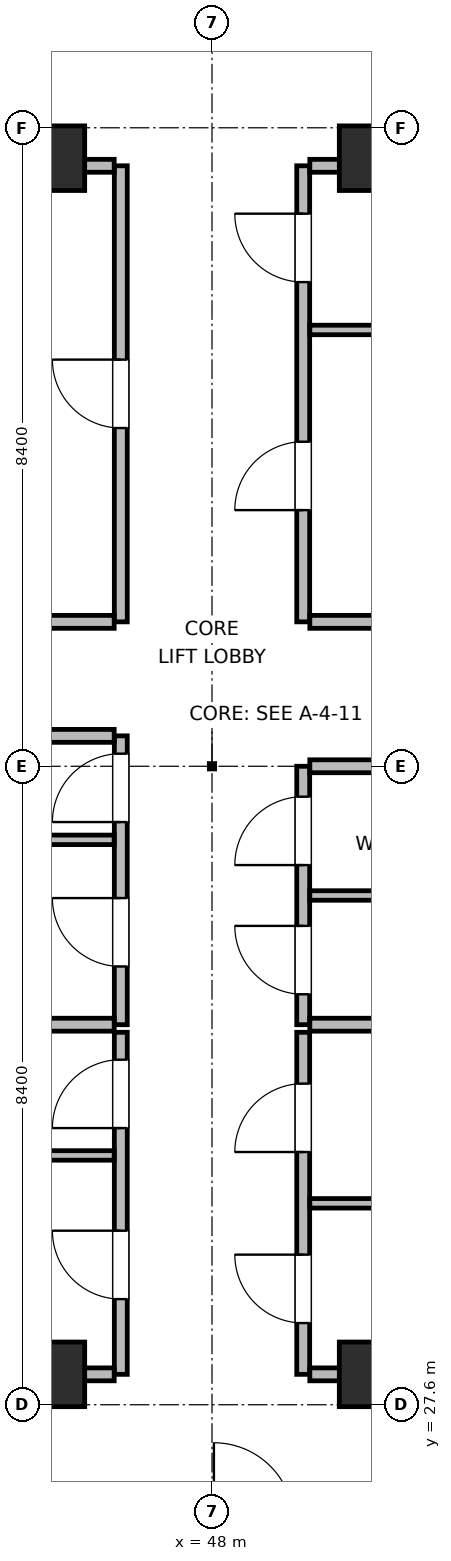
"""IFC4 building model, lengths in metres.
Left out: names, types, materials, properties, quantities, classifications, styles, units other than length and angle.
Written with IfcOpenShell. Run it as: python <this file> out.ifc"""

import sys

from ifc_helpers import new_model, si_unit, direction, frame, frame_2d, origin, origin_2d, place, context, subcontext, project, spatial, rectangle, extrude, element, fill, save


model = new_model("IFC4")
c1 = context("Model", 3, precision=1e-05, world=origin(), true_north=direction((0.0, 1.0)))
c2 = subcontext(c1, "Body", "Model", "MODEL_VIEW")
j1 = project(units=[si_unit("LENGTHUNIT", "METRE"), si_unit("PLANEANGLEUNIT", "RADIAN")], contexts=[c1])
p1 = place(None, origin())
s1 = spatial("IfcSite", under=j1, at=p1, CompositionType="ELEMENT")
p2 = place(p1, origin())
s2 = spatial("IfcBuilding", under=s1, at=p2, CompositionType="ELEMENT")
p3 = place(p2, frame((0.0, 0.0, 346.5)))
s3 = spatial("IfcBuildingStorey", under=s2, at=p3, CompositionType="ELEMENT", Elevation=346.5)
for number, where, z_axis, x_axis in (
    (1, (45.9, 28.0, 0.0), (0.0, 0.0, 1.0), (1.0, 0.0, 0.0)),
    (2, (50.1, 28.0, 0.0), (0.0, 0.0, 1.0), (1.0, 0.0, 0.0)),
    (3, (45.9, 44.0, 0.0), (0.0, 0.0, 1.0), (1.0, 0.0, 0.0)),
    (4, (50.1, 44.0, 0.0), (0.0, 0.0, 1.0), (1.0, 0.0, 0.0)),
):
    element("IfcColumn", number, at=place(p3, frame(where, z_axis=z_axis, x_axis=x_axis)), inside=s3, PredefinedType="COLUMN", context=c2, shape_type="SweptSolid", body=[
        extrude(rectangle(XDim=0.85, YDim=0.85, at=origin_2d()), origin(), (0.0, 0.0, 1.0), 3.9),
    ])
p4 = place(p3, frame((46.8, 32.6, 0.0), z_axis=(0.0, 0.0, 1.0), x_axis=(0.0, 1.0, 0.0)))
e5 = element("IfcWall", 5, at=p4, inside=s3, PredefinedType="PARTITIONING", context=c2, shape_type="SweptSolid", body=[
    extrude(rectangle(XDim=3.8, YDim=0.17, at=frame_2d((1.9, 0.0))), origin(), (0.0, 0.0, 1.0), 3.68),
])
p5 = place(p4, frame((0.766, 0.0, 0.0)))
e6 = element("IfcOpeningElement", 6, at=p5, cuts=e5, PredefinedType="OPENING", context=c2, shape_type="SweptSolid", body=[
    extrude(rectangle(XDim=0.9, YDim=2.02, at=frame_2d((0.45, 1.01))), frame((0.0, 0.095, 0.0), z_axis=(0.0, -1.0, 0.0), x_axis=(1.0, 0.0, 0.0)), (0.0, 0.0, 1.0), 0.19),
])
p6 = place(p4, frame((2.666, 0.0, 0.0)))
e7 = element("IfcOpeningElement", 7, at=p6, cuts=e5, PredefinedType="OPENING", context=c2, shape_type="SweptSolid", body=[
    extrude(rectangle(XDim=0.9, YDim=2.02, at=frame_2d((0.45, 1.01))), frame((0.0, 0.095, 0.0), z_axis=(0.0, -1.0, 0.0), x_axis=(1.0, 0.0, 0.0)), (0.0, 0.0, 1.0), 0.19),
])
for number, where, z_axis, x_axis in (
    (8, (43.8, 32.6, 0.0), (0.0, 0.0, 1.0), (1.0, 0.0, 0.0)),
    (9, (43.8, 36.4, 0.0), (0.0, 0.0, 1.0), (1.0, 0.0, 0.0)),
):
    element("IfcWall", number, at=place(p3, frame(where, z_axis=z_axis, x_axis=x_axis)), inside=s3, PredefinedType="PARTITIONING", context=c2, shape_type="SweptSolid", body=[
        extrude(rectangle(XDim=2.913, YDim=0.17, at=frame_2d((1.457, 0.0))), origin(), (0.0, 0.0, 1.0), 3.68),
    ])
p7 = place(p3, frame((43.8, 35.032, 0.0), z_axis=(0.0, 0.0, 1.0), x_axis=(1.0, 0.0, 0.0)))
e10 = element("IfcWall", 10, at=p7, inside=s3, PredefinedType="PARTITIONING", context=c2, shape_type="SweptSolid", body=[
    extrude(rectangle(XDim=2.913, YDim=0.125, at=frame_2d((1.457, 0.0))), origin(), (0.0, 0.0, 1.0), 3.68),
])
p8 = place(p3, frame((49.2, 32.6, 0.0), z_axis=(0.0, 0.0, 1.0), x_axis=(0.0, 1.0, 0.0)))
e11 = element("IfcWall", 11, at=p8, inside=s3, PredefinedType="PARTITIONING", context=c2, shape_type="SweptSolid", body=[
    extrude(rectangle(XDim=3.4, YDim=0.17, at=frame_2d((1.7, 0.0))), origin(), (0.0, 0.0, 1.0), 3.68),
])
p9 = place(p8, frame((0.4, 0.0, 0.0)))
e12 = element("IfcOpeningElement", 12, at=p9, cuts=e11, PredefinedType="OPENING", context=c2, shape_type="SweptSolid", body=[
    extrude(rectangle(XDim=0.9, YDim=2.02, at=frame_2d((0.45, 1.01))), frame((0.0, 0.095, 0.0), z_axis=(0.0, -1.0, 0.0), x_axis=(1.0, 0.0, 0.0)), (0.0, 0.0, 1.0), 0.19),
])
p10 = place(p8, frame((2.1, 0.0, 0.0)))
e13 = element("IfcOpeningElement", 13, at=p10, cuts=e11, PredefinedType="OPENING", context=c2, shape_type="SweptSolid", body=[
    extrude(rectangle(XDim=0.9, YDim=2.02, at=frame_2d((0.45, 1.01))), frame((0.0, 0.095, 0.0), z_axis=(0.0, -1.0, 0.0), x_axis=(1.0, 0.0, 0.0)), (0.0, 0.0, 1.0), 0.19),
])
for number, where, z_axis, x_axis in (
    (14, (49.287, 32.6, 0.0), (0.0, 0.0, 1.0), (1.0, 0.0, 0.0)),
    (15, (49.287, 36.0, 0.0), (0.0, 0.0, 1.0), (1.0, 0.0, 0.0)),
):
    element("IfcWall", number, at=place(p3, frame(where, z_axis=z_axis, x_axis=x_axis)), inside=s3, PredefinedType="PARTITIONING", context=c2, shape_type="SweptSolid", body=[
        extrude(rectangle(XDim=2.913, YDim=0.17, at=frame_2d((1.457, 0.0))), origin(), (0.0, 0.0, 1.0), 3.68),
    ])
p11 = place(p3, frame((49.287, 34.3, 0.0), z_axis=(0.0, 0.0, 1.0), x_axis=(1.0, 0.0, 0.0)))
e16 = element("IfcWall", 16, at=p11, inside=s3, PredefinedType="PARTITIONING", context=c2, shape_type="SweptSolid", body=[
    extrude(rectangle(XDim=2.913, YDim=0.125, at=frame_2d((1.457, 0.0))), origin(), (0.0, 0.0, 1.0), 3.68),
])
p12 = place(p3, frame((46.8, 28.0, 0.0), z_axis=(0.0, 0.0, 1.0), x_axis=(0.0, 1.0, 0.0)))
e17 = element("IfcWall", 17, at=p12, inside=s3, PredefinedType="PARTITIONING", context=c2, shape_type="SweptSolid", body=[
    extrude(rectangle(XDim=4.5, YDim=0.17, at=frame_2d((2.25, 0.0))), origin(), (0.0, 0.0, 1.0), 3.68),
])
p13 = place(p12, frame((0.99, 0.0, 0.0)))
e18 = element("IfcOpeningElement", 18, at=p13, cuts=e17, PredefinedType="OPENING", context=c2, shape_type="SweptSolid", body=[
    extrude(rectangle(XDim=0.9, YDim=2.02, at=frame_2d((0.45, 1.01))), frame((0.0, 0.095, 0.0), z_axis=(0.0, -1.0, 0.0), x_axis=(1.0, 0.0, 0.0)), (0.0, 0.0, 1.0), 0.19),
])
p14 = place(p12, frame((3.24, 0.0, 0.0)))
e19 = element("IfcOpeningElement", 19, at=p14, cuts=e17, PredefinedType="OPENING", context=c2, shape_type="SweptSolid", body=[
    extrude(rectangle(XDim=0.9, YDim=2.02, at=frame_2d((0.45, 1.01))), frame((0.0, 0.095, 0.0), z_axis=(0.0, -1.0, 0.0), x_axis=(1.0, 0.0, 0.0)), (0.0, 0.0, 1.0), 0.19),
])
p15 = place(p3, frame((42.5, 28.0, 0.0), z_axis=(0.0, 0.0, 1.0), x_axis=(1.0, 0.0, 0.0)))
e20 = element("IfcWall", 20, at=p15, inside=s3, PredefinedType="PARTITIONING", context=c2, shape_type="SweptSolid", body=[
    extrude(rectangle(XDim=4.213, YDim=0.17, at=frame_2d((2.106, 0.0))), origin(), (0.0, 0.0, 1.0), 2.765),
])
p16 = place(p3, frame((42.5, 30.88, 0.0), z_axis=(0.0, 0.0, 1.0), x_axis=(1.0, 0.0, 0.0)))
e21 = element("IfcWall", 21, at=p16, inside=s3, PredefinedType="PARTITIONING", context=c2, shape_type="SweptSolid", body=[
    extrude(rectangle(XDim=4.213, YDim=0.125, at=frame_2d((2.106, 0.0))), origin(), (0.0, 0.0, 1.0), 3.68),
])
p17 = place(p3, frame((49.2, 28.0, 0.0), z_axis=(0.0, 0.0, 1.0), x_axis=(0.0, 1.0, 0.0)))
e22 = element("IfcWall", 22, at=p17, inside=s3, PredefinedType="PARTITIONING", context=c2, shape_type="SweptSolid", body=[
    extrude(rectangle(XDim=4.5, YDim=0.17, at=frame_2d((2.25, 0.0))), origin(), (0.0, 0.0, 1.0), 3.68),
])
p18 = place(p17, frame((0.675, 0.0, 0.0)))
e23 = element("IfcOpeningElement", 23, at=p18, cuts=e22, PredefinedType="OPENING", context=c2, shape_type="SweptSolid", body=[
    extrude(rectangle(XDim=0.9, YDim=2.02, at=frame_2d((0.45, 1.01))), frame((0.0, 0.095, 0.0), z_axis=(0.0, -1.0, 0.0), x_axis=(1.0, 0.0, 0.0)), (0.0, 0.0, 1.0), 0.19),
])
p19 = place(p17, frame((2.925, 0.0, 0.0)))
e24 = element("IfcOpeningElement", 24, at=p19, cuts=e22, PredefinedType="OPENING", context=c2, shape_type="SweptSolid", body=[
    extrude(rectangle(XDim=0.9, YDim=2.02, at=frame_2d((0.45, 1.01))), frame((0.0, 0.095, 0.0), z_axis=(0.0, -1.0, 0.0), x_axis=(1.0, 0.0, 0.0)), (0.0, 0.0, 1.0), 0.19),
])
p20 = place(p3, frame((49.287, 28.0, 0.0), z_axis=(0.0, 0.0, 1.0), x_axis=(1.0, 0.0, 0.0)))
e25 = element("IfcWall", 25, at=p20, inside=s3, PredefinedType="PARTITIONING", context=c2, shape_type="SweptSolid", body=[
    extrude(rectangle(XDim=4.213, YDim=0.17, at=frame_2d((2.106, 0.0))), origin(), (0.0, 0.0, 1.0), 2.765),
])
p21 = place(p3, frame((49.287, 30.25, 0.0), z_axis=(0.0, 0.0, 1.0), x_axis=(1.0, 0.0, 0.0)))
e26 = element("IfcWall", 26, at=p21, inside=s3, PredefinedType="PARTITIONING", context=c2, shape_type="SweptSolid", body=[
    extrude(rectangle(XDim=4.213, YDim=0.125, at=frame_2d((2.106, 0.0))), origin(), (0.0, 0.0, 1.0), 3.68),
])
p22 = place(p3, frame((46.8, 37.9, 0.0), z_axis=(0.0, 0.0, 1.0), x_axis=(0.0, 1.0, 0.0)))
e27 = element("IfcWall", 27, at=p22, inside=s3, PredefinedType="PARTITIONING", context=c2, shape_type="SweptSolid", body=[
    extrude(rectangle(XDim=6.0, YDim=0.17, at=frame_2d((3.0, 0.0))), origin(), (0.0, 0.0, 1.0), 3.68),
])
p23 = place(p22, frame((2.55, 0.0, 0.0)))
e28 = element("IfcOpeningElement", 28, at=p23, cuts=e27, PredefinedType="OPENING", context=c2, shape_type="SweptSolid", body=[
    extrude(rectangle(XDim=0.9, YDim=2.02, at=frame_2d((0.45, 1.01))), frame((0.0, 0.095, 0.0), z_axis=(0.0, -1.0, 0.0), x_axis=(1.0, 0.0, 0.0)), (0.0, 0.0, 1.0), 0.19),
])
p24 = place(p3, frame((42.5, 37.9, 0.0), z_axis=(0.0, 0.0, 1.0), x_axis=(1.0, 0.0, 0.0)))
e29 = element("IfcWall", 29, at=p24, inside=s3, PredefinedType="PARTITIONING", context=c2, shape_type="SweptSolid", body=[
    extrude(rectangle(XDim=4.213, YDim=0.17, at=frame_2d((2.106, 0.0))), origin(), (0.0, 0.0, 1.0), 3.68),
])
p25 = place(p3, frame((42.5, 43.9, 0.0), z_axis=(0.0, 0.0, 1.0), x_axis=(1.0, 0.0, 0.0)))
e30 = element("IfcWall", 30, at=p25, inside=s3, PredefinedType="PARTITIONING", context=c2, shape_type="SweptSolid", body=[
    extrude(rectangle(XDim=4.213, YDim=0.17, at=frame_2d((2.106, 0.0))), origin(), (0.0, 0.0, 1.0), 2.765),
])
p26 = place(p3, frame((49.2, 37.9, 0.0), z_axis=(0.0, 0.0, 1.0), x_axis=(0.0, 1.0, 0.0)))
e31 = element("IfcWall", 31, at=p26, inside=s3, PredefinedType="PARTITIONING", context=c2, shape_type="SweptSolid", body=[
    extrude(rectangle(XDim=6.0, YDim=0.17, at=frame_2d((3.0, 0.0))), origin(), (0.0, 0.0, 1.0), 3.68),
])
p27 = place(p26, frame((1.47, 0.0, 0.0)))
e32 = element("IfcOpeningElement", 32, at=p27, cuts=e31, PredefinedType="OPENING", context=c2, shape_type="SweptSolid", body=[
    extrude(rectangle(XDim=0.9, YDim=2.02, at=frame_2d((0.45, 1.01))), frame((0.0, 0.095, 0.0), z_axis=(0.0, -1.0, 0.0), x_axis=(1.0, 0.0, 0.0)), (0.0, 0.0, 1.0), 0.19),
])
p28 = place(p26, frame((4.47, 0.0, 0.0)))
e33 = element("IfcOpeningElement", 33, at=p28, cuts=e31, PredefinedType="OPENING", context=c2, shape_type="SweptSolid", body=[
    extrude(rectangle(XDim=0.9, YDim=2.02, at=frame_2d((0.45, 1.01))), frame((0.0, 0.095, 0.0), z_axis=(0.0, -1.0, 0.0), x_axis=(1.0, 0.0, 0.0)), (0.0, 0.0, 1.0), 0.19),
])
p29 = place(p3, frame((49.287, 37.9, 0.0), z_axis=(0.0, 0.0, 1.0), x_axis=(1.0, 0.0, 0.0)))
e34 = element("IfcWall", 34, at=p29, inside=s3, PredefinedType="PARTITIONING", context=c2, shape_type="SweptSolid", body=[
    extrude(rectangle(XDim=4.113, YDim=0.17, at=frame_2d((2.056, 0.0))), origin(), (0.0, 0.0, 1.0), 3.68),
])
p30 = place(p3, frame((49.287, 43.9, 0.0), z_axis=(0.0, 0.0, 1.0), x_axis=(1.0, 0.0, 0.0)))
e35 = element("IfcWall", 35, at=p30, inside=s3, PredefinedType="PARTITIONING", context=c2, shape_type="SweptSolid", body=[
    extrude(rectangle(XDim=4.113, YDim=0.17, at=frame_2d((2.056, 0.0))), origin(), (0.0, 0.0, 1.0), 2.765),
])
p31 = place(p3, frame((49.287, 41.74, 0.0), z_axis=(0.0, 0.0, 1.0), x_axis=(1.0, 0.0, 0.0)))
e36 = element("IfcWall", 36, at=p31, inside=s3, PredefinedType="PARTITIONING", context=c2, shape_type="SweptSolid", body=[
    extrude(rectangle(XDim=4.113, YDim=0.125, at=frame_2d((2.056, 0.0))), origin(), (0.0, 0.0, 1.0), 3.68),
])
p32 = place(p5, origin())
e37 = element("IfcDoor", 37, at=p32, inside=s3, OperationType="SINGLE_SWING_RIGHT", PredefinedType="DOOR", context=c2, shape_type="SweptSolid", body=[
    extrude(rectangle(XDim=0.9, YDim=2.02, at=frame_2d((0.45, 1.01))), frame((0.0, 0.025, 0.0), z_axis=(0.0, -1.0, 0.0), x_axis=(1.0, 0.0, 0.0)), (0.0, 0.0, 1.0), 0.05),
])
fill(e6, e37)
p33 = place(p6, origin())
e38 = element("IfcDoor", 38, at=p33, inside=s3, OperationType="SINGLE_SWING_LEFT", PredefinedType="DOOR", context=c2, shape_type="SweptSolid", body=[
    extrude(rectangle(XDim=0.9, YDim=2.02, at=frame_2d((0.45, 1.01))), frame((0.0, 0.025, 0.0), z_axis=(0.0, -1.0, 0.0), x_axis=(1.0, 0.0, 0.0)), (0.0, 0.0, 1.0), 0.05),
])
fill(e7, e38)
p34 = place(p9, origin())
e39 = element("IfcDoor", 39, at=p34, inside=s3, OperationType="SINGLE_SWING_RIGHT", PredefinedType="DOOR", context=c2, shape_type="SweptSolid", body=[
    extrude(rectangle(XDim=0.9, YDim=2.02, at=frame_2d((0.45, 1.01))), frame((0.0, 0.025, 0.0), z_axis=(0.0, -1.0, 0.0), x_axis=(1.0, 0.0, 0.0)), (0.0, 0.0, 1.0), 0.05),
])
fill(e12, e39)
p35 = place(p10, origin())
e40 = element("IfcDoor", 40, at=p35, inside=s3, OperationType="SINGLE_SWING_LEFT", PredefinedType="DOOR", context=c2, shape_type="SweptSolid", body=[
    extrude(rectangle(XDim=0.9, YDim=2.02, at=frame_2d((0.45, 1.01))), frame((0.0, 0.025, 0.0), z_axis=(0.0, -1.0, 0.0), x_axis=(1.0, 0.0, 0.0)), (0.0, 0.0, 1.0), 0.05),
])
fill(e13, e40)
p36 = place(p13, origin())
e41 = element("IfcDoor", 41, at=p36, inside=s3, OperationType="SINGLE_SWING_RIGHT", PredefinedType="DOOR", context=c2, shape_type="SweptSolid", body=[
    extrude(rectangle(XDim=0.9, YDim=2.02, at=frame_2d((0.45, 1.01))), frame((0.0, 0.025, 0.0), z_axis=(0.0, -1.0, 0.0), x_axis=(1.0, 0.0, 0.0)), (0.0, 0.0, 1.0), 0.05),
])
fill(e18, e41)
p37 = place(p14, origin())
e42 = element("IfcDoor", 42, at=p37, inside=s3, OperationType="SINGLE_SWING_LEFT", PredefinedType="DOOR", context=c2, shape_type="SweptSolid", body=[
    extrude(rectangle(XDim=0.9, YDim=2.02, at=frame_2d((0.45, 1.01))), frame((0.0, 0.025, 0.0), z_axis=(0.0, -1.0, 0.0), x_axis=(1.0, 0.0, 0.0)), (0.0, 0.0, 1.0), 0.05),
])
fill(e19, e42)
p38 = place(p18, origin())
e43 = element("IfcDoor", 43, at=p38, inside=s3, OperationType="SINGLE_SWING_RIGHT", PredefinedType="DOOR", context=c2, shape_type="SweptSolid", body=[
    extrude(rectangle(XDim=0.9, YDim=2.02, at=frame_2d((0.45, 1.01))), frame((0.0, 0.025, 0.0), z_axis=(0.0, -1.0, 0.0), x_axis=(1.0, 0.0, 0.0)), (0.0, 0.0, 1.0), 0.05),
])
fill(e23, e43)
p39 = place(p19, origin())
e44 = element("IfcDoor", 44, at=p39, inside=s3, OperationType="SINGLE_SWING_LEFT", PredefinedType="DOOR", context=c2, shape_type="SweptSolid", body=[
    extrude(rectangle(XDim=0.9, YDim=2.02, at=frame_2d((0.45, 1.01))), frame((0.0, 0.025, 0.0), z_axis=(0.0, -1.0, 0.0), x_axis=(1.0, 0.0, 0.0)), (0.0, 0.0, 1.0), 0.05),
])
fill(e24, e44)
p40 = place(p23, origin())
e45 = element("IfcDoor", 45, at=p40, inside=s3, OperationType="SINGLE_SWING_RIGHT", PredefinedType="DOOR", context=c2, shape_type="SweptSolid", body=[
    extrude(rectangle(XDim=0.9, YDim=2.02, at=frame_2d((0.45, 1.01))), frame((0.0, 0.025, 0.0), z_axis=(0.0, -1.0, 0.0), x_axis=(1.0, 0.0, 0.0)), (0.0, 0.0, 1.0), 0.05),
])
fill(e28, e45)
p41 = place(p27, origin())
e46 = element("IfcDoor", 46, at=p41, inside=s3, OperationType="SINGLE_SWING_LEFT", PredefinedType="DOOR", context=c2, shape_type="SweptSolid", body=[
    extrude(rectangle(XDim=0.9, YDim=2.02, at=frame_2d((0.45, 1.01))), frame((0.0, 0.025, 0.0), z_axis=(0.0, -1.0, 0.0), x_axis=(1.0, 0.0, 0.0)), (0.0, 0.0, 1.0), 0.05),
])
fill(e32, e46)
p42 = place(p28, origin())
e47 = element("IfcDoor", 47, at=p42, inside=s3, OperationType="SINGLE_SWING_RIGHT", PredefinedType="DOOR", context=c2, shape_type="SweptSolid", body=[
    extrude(rectangle(XDim=0.9, YDim=2.02, at=frame_2d((0.45, 1.01))), frame((0.0, 0.025, 0.0), z_axis=(0.0, -1.0, 0.0), x_axis=(1.0, 0.0, 0.0)), (0.0, 0.0, 1.0), 0.05),
])
fill(e33, e47)
save(model, sys.argv[1])
